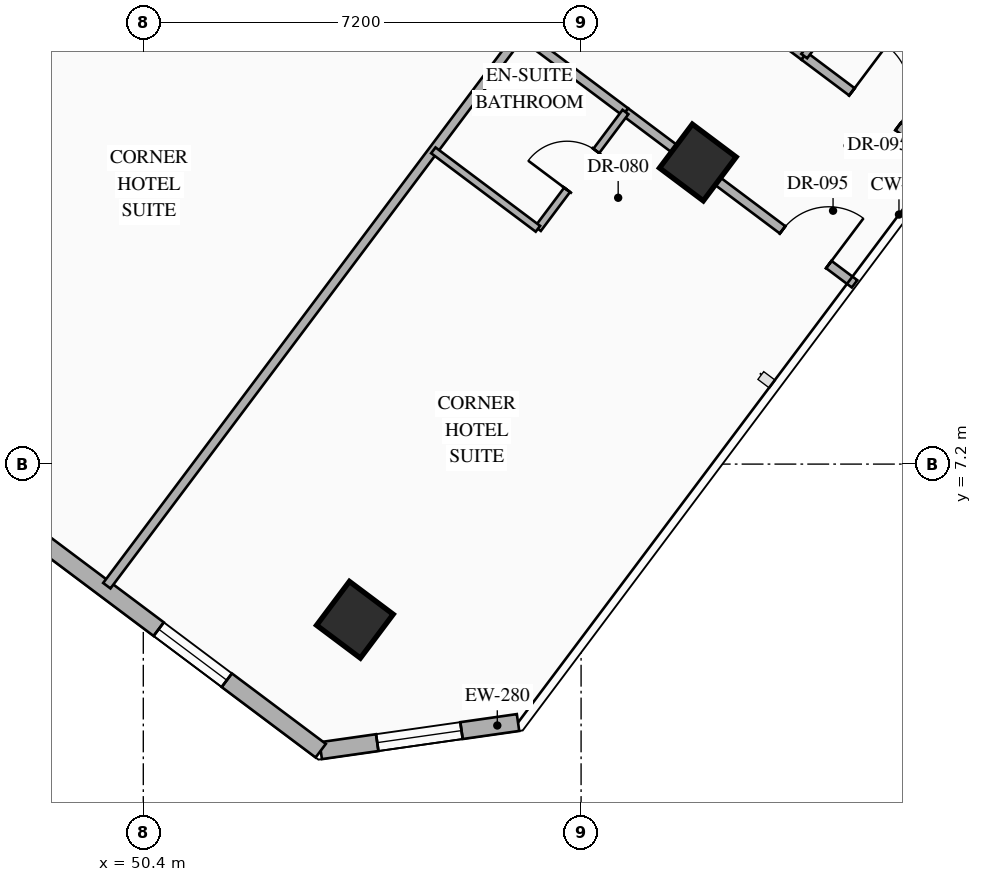
"""IFC4 building model, lengths in metres.
Left out: names, types, materials, properties, quantities, classifications, styles, units other than length and angle.
Written with IfcOpenShell. Run it as: python <this file> out.ifc"""

import sys

from ifc_helpers import new_model, si_unit, direction, frame, frame_2d, origin, origin_2d, place, context, subcontext, project, spatial, rectangle, hollow_rectangle, extrude, element, fill, save


model = new_model("IFC4")
c1 = context("Model", 3, precision=1e-05, world=origin(), true_north=direction((0.0, 1.0)))
c2 = subcontext(c1, "Body", "Model", "MODEL_VIEW")
j1 = project(units=[si_unit("LENGTHUNIT", "METRE"), si_unit("PLANEANGLEUNIT", "RADIAN")], contexts=[c1])
p1 = place(None, origin())
s1 = spatial("IfcSite", under=j1, at=p1, CompositionType="ELEMENT")
p2 = place(p1, origin())
s2 = spatial("IfcBuilding", under=s1, at=p2, CompositionType="ELEMENT")
p3 = place(p2, frame((0.0, 0.0, 81.3)))
s3 = spatial("IfcBuildingStorey", under=s2, at=p3, CompositionType="ELEMENT", Elevation=81.3)
for number, where, z_axis, x_axis in (
    (1, (53.88, 4.64, 0.0), (0.0, 0.0, 1.0), (0.8, -0.6, 0.0)),
    (2, (59.52, 12.16, 0.0), (0.0, 0.0, 1.0), (0.8, -0.6, 0.0)),
):
    element("IfcColumn", number, at=place(p3, frame(where, z_axis=z_axis, x_axis=x_axis)), inside=s3, PredefinedType="COLUMN", context=c2, shape_type="SweptSolid", body=[
        extrude(hollow_rectangle(XDim=0.9, YDim=0.9, WallThickness=0.036, at=origin_2d()), origin(), (0.0, 0.0, 1.0), 3.35),
    ])
p4 = place(p3, frame((56.563, 2.95, 0.0), z_axis=(0.0, 0.0, 1.0), x_axis=(-0.989977778067, -0.141223223777, 0.0)))
e3 = element("IfcWall", 3, at=p4, inside=s3, PredefinedType="STANDARD", context=c2, shape_type="SweptSolid", body=[
    extrude(rectangle(XDim=3.278, YDim=0.28, at=frame_2d((1.639, 0.0))), origin(), (0.0, 0.0, 1.0), 3.13),
])
p5 = place(p4, frame((0.939, 0.0, 0.85)))
e4 = element("IfcOpeningElement", 4, at=p5, cuts=e3, PredefinedType="OPENING", context=c2, shape_type="SweptSolid", body=[
    extrude(rectangle(XDim=1.4, YDim=1.8, at=frame_2d((0.7, 0.9))), frame((0.0, 0.15, 0.0), z_axis=(0.0, -1.0, 0.0), x_axis=(1.0, 0.0, 0.0)), (0.0, 0.0, 1.0), 0.3),
])
p6 = place(p3, frame((53.318, 2.487, 0.0), z_axis=(0.0, 0.0, 1.0), x_axis=(-0.800004174678, 0.599994433723, 0.0)))
e5 = element("IfcWall", 5, at=p6, inside=s3, PredefinedType="STANDARD", context=c2, shape_type="SweptSolid", body=[
    extrude(rectangle(XDim=35.089, YDim=0.28, at=frame_2d((17.544, 0.0))), origin(), (0.0, 0.0, 1.0), 3.13),
])
p7 = place(p6, frame((1.931, 0.0, 0.85)))
e6 = element("IfcOpeningElement", 6, at=p7, cuts=e5, PredefinedType="OPENING", context=c2, shape_type="SweptSolid", body=[
    extrude(rectangle(XDim=1.4, YDim=1.8, at=frame_2d((0.7, 0.9))), frame((0.0, 0.15, 0.0), z_axis=(0.0, -1.0, 0.0), x_axis=(1.0, 0.0, 0.0)), (0.0, 0.0, 1.0), 0.3),
])
p8 = place(p6, frame((6.819, 0.0, 0.85)))
e7 = element("IfcOpeningElement", 7, at=p8, cuts=e5, PredefinedType="OPENING", context=c2, shape_type="SweptSolid", body=[
    extrude(rectangle(XDim=1.4, YDim=1.8, at=frame_2d((0.7, 0.9))), frame((0.0, 0.15, 0.0), z_axis=(0.0, -1.0, 0.0), x_axis=(1.0, 0.0, 0.0)), (0.0, 0.0, 1.0), 0.3),
])
p9 = place(p6, frame((11.832, 0.0, 0.85)))
e8 = element("IfcOpeningElement", 8, at=p9, cuts=e5, PredefinedType="OPENING", context=c2, shape_type="SweptSolid", body=[
    extrude(rectangle(XDim=1.4, YDim=1.8, at=frame_2d((0.7, 0.9))), frame((0.0, 0.15, 0.0), z_axis=(0.0, -1.0, 0.0), x_axis=(1.0, 0.0, 0.0)), (0.0, 0.0, 1.0), 0.3),
])
p10 = place(p6, frame((17.647, 0.0, 0.85)))
e9 = element("IfcOpeningElement", 9, at=p10, cuts=e5, PredefinedType="OPENING", context=c2, shape_type="SweptSolid", body=[
    extrude(rectangle(XDim=1.4, YDim=1.8, at=frame_2d((0.7, 0.9))), frame((0.0, 0.15, 0.0), z_axis=(0.0, -1.0, 0.0), x_axis=(1.0, 0.0, 0.0)), (0.0, 0.0, 1.0), 0.3),
])
p11 = place(p6, frame((21.857, 0.0, 0.85)))
e10 = element("IfcOpeningElement", 10, at=p11, cuts=e5, PredefinedType="OPENING", context=c2, shape_type="SweptSolid", body=[
    extrude(rectangle(XDim=1.4, YDim=1.8, at=frame_2d((0.7, 0.9))), frame((0.0, 0.15, 0.0), z_axis=(0.0, -1.0, 0.0), x_axis=(1.0, 0.0, 0.0)), (0.0, 0.0, 1.0), 0.3),
])
p12 = place(p6, frame((26.87, 0.0, 0.85)))
e11 = element("IfcOpeningElement", 11, at=p12, cuts=e5, PredefinedType="OPENING", context=c2, shape_type="SweptSolid", body=[
    extrude(rectangle(XDim=1.4, YDim=1.8, at=frame_2d((0.7, 0.9))), frame((0.0, 0.15, 0.0), z_axis=(0.0, -1.0, 0.0), x_axis=(1.0, 0.0, 0.0)), (0.0, 0.0, 1.0), 0.3),
])
p13 = place(p6, frame((31.757, 0.0, 0.85)))
e12 = element("IfcOpeningElement", 12, at=p13, cuts=e5, PredefinedType="OPENING", context=c2, shape_type="SweptSolid", body=[
    extrude(rectangle(XDim=1.4, YDim=1.8, at=frame_2d((0.7, 0.9))), frame((0.0, 0.15, 0.0), z_axis=(0.0, -1.0, 0.0), x_axis=(1.0, 0.0, 0.0)), (0.0, 0.0, 1.0), 0.3),
])
p14 = place(p3, frame((59.55, 15.2, 0.0), z_axis=(0.0, 0.0, 1.0), x_axis=(0.79998637334, -0.60001816845, 0.0)))
e13 = element("IfcWall", 13, at=p14, inside=s3, PredefinedType="PARTITIONING", context=c2, shape_type="SweptSolid", body=[
    extrude(rectangle(XDim=2.15, YDim=0.15, at=frame_2d((1.075, 0.0))), origin(), (0.0, 0.0, 1.0), 2.775),
])
p15 = place(p3, frame((61.27, 13.91, 0.0), z_axis=(0.0, 0.0, 1.0), x_axis=(0.800010068184, -0.59998657552, 0.0)))
e14 = element("IfcWall", 14, at=p15, inside=s3, PredefinedType="PARTITIONING", context=c2, shape_type="SweptSolid", body=[
    extrude(rectangle(XDim=2.91, YDim=0.15, at=frame_2d((1.455, 0.0))), origin(), (0.0, 0.0, 1.0), 3.13),
])
p16 = place(p15, frame((0.98, 0.0, 0.0)))
e15 = element("IfcOpeningElement", 15, at=p16, cuts=e14, PredefinedType="OPENING", context=c2, shape_type="SweptSolid", body=[
    extrude(rectangle(XDim=0.95, YDim=2.15, at=frame_2d((0.475, 1.075))), frame((0.0, 0.085, 0.0), z_axis=(0.0, -1.0, 0.0), x_axis=(1.0, 0.0, 0.0)), (0.0, 0.0, 1.0), 0.17),
])
p17 = place(p3, frame((61.27, 13.91, 0.0), z_axis=(0.0, 0.0, 1.0), x_axis=(0.599951172744, 0.800036618114, 0.0)))
e16 = element("IfcWall", 16, at=p17, inside=s3, PredefinedType="PARTITIONING", context=c2, shape_type="SweptSolid", body=[
    extrude(rectangle(XDim=2.4, YDim=0.12, at=frame_2d((1.2, 0.0))), origin(), (0.0, 0.0, 1.0), 3.13),
])
p18 = place(p17, frame((0.8, 0.0, 0.0)))
e17 = element("IfcOpeningElement", 17, at=p18, cuts=e16, PredefinedType="OPENING", context=c2, shape_type="SweptSolid", body=[
    extrude(rectangle(XDim=0.8, YDim=2.06, at=frame_2d((0.4, 1.03))), frame((0.0, 0.07, 0.0), z_axis=(0.0, -1.0, 0.0), x_axis=(1.0, 0.0, 0.0)), (0.0, 0.0, 1.0), 0.14),
])
p19 = place(p3, frame((44.36, 9.28, 0.0), z_axis=(0.0, 0.0, 1.0), x_axis=(0.599986233332, 0.800010324816, 0.0)))
e18 = element("IfcWall", 18, at=p19, inside=s3, PredefinedType="PARTITIONING", context=c2, shape_type="SweptSolid", body=[
    extrude(rectangle(XDim=11.35, YDim=0.15, at=frame_2d((5.675, 0.0))), origin(), (0.0, 0.0, 1.0), 2.425),
])
p20 = place(p3, frame((49.8, 5.2, 0.0), z_axis=(0.0, 0.0, 1.0), x_axis=(0.6, 0.8, 0.0)))
e19 = element("IfcWall", 19, at=p20, inside=s3, PredefinedType="PARTITIONING", context=c2, shape_type="SweptSolid", body=[
    extrude(rectangle(XDim=11.35, YDim=0.15, at=frame_2d((5.675, 0.0))), origin(), (0.0, 0.0, 1.0), 3.13),
])
p21 = place(p3, frame((56.61, 14.28, 0.0), z_axis=(0.0, 0.0, 1.0), x_axis=(0.79998637334, -0.60001816845, 0.0)))
e20 = element("IfcWall", 20, at=p21, inside=s3, PredefinedType="PARTITIONING", context=c2, shape_type="SweptSolid", body=[
    extrude(rectangle(XDim=2.15, YDim=0.15, at=frame_2d((1.075, 0.0))), origin(), (0.0, 0.0, 1.0), 2.425),
])
p22 = place(p3, frame((58.33, 12.99, 0.0), z_axis=(0.0, 0.0, 1.0), x_axis=(0.799993779569, -0.600008293819, 0.0)))
e21 = element("IfcWall", 21, at=p22, inside=s3, PredefinedType="PARTITIONING", context=c2, shape_type="SweptSolid", body=[
    extrude(rectangle(XDim=4.71, YDim=0.15, at=frame_2d((2.355, 0.0))), origin(), (0.0, 0.0, 1.0), 2.425),
])
p23 = place(p22, frame((3.23, 0.0, 0.0)))
e22 = element("IfcOpeningElement", 22, at=p23, cuts=e21, PredefinedType="OPENING", context=c2, shape_type="SweptSolid", body=[
    extrude(rectangle(XDim=0.95, YDim=2.15, at=frame_2d((0.475, 1.075))), frame((0.0, 0.085, 0.0), z_axis=(0.0, -1.0, 0.0), x_axis=(1.0, 0.0, 0.0)), (0.0, 0.0, 1.0), 0.17),
])
p24 = place(p3, frame((56.89, 11.07, 0.0), z_axis=(0.0, 0.0, 1.0), x_axis=(0.600065100855, 0.79995117022, 0.0)))
e23 = element("IfcWall", 23, at=p24, inside=s3, PredefinedType="PARTITIONING", context=c2, shape_type="SweptSolid", body=[
    extrude(rectangle(XDim=2.4, YDim=0.12, at=frame_2d((1.2, 0.0))), origin(), (0.0, 0.0, 1.0), 3.13),
])
p25 = place(p24, frame((0.8, 0.0, 0.0)))
e24 = element("IfcOpeningElement", 24, at=p25, cuts=e23, PredefinedType="OPENING", context=c2, shape_type="SweptSolid", body=[
    extrude(rectangle(XDim=0.8, YDim=2.06, at=frame_2d((0.4, 1.03))), frame((0.0, 0.07, 0.0), z_axis=(0.0, -1.0, 0.0), x_axis=(1.0, 0.0, 0.0)), (0.0, 0.0, 1.0), 0.14),
])
p26 = place(p3, frame((55.17, 12.36, 0.0), z_axis=(0.0, 0.0, 1.0), x_axis=(0.79998637334, -0.60001816845, 0.0)))
e25 = element("IfcWall", 25, at=p26, inside=s3, PredefinedType="PARTITIONING", context=c2, shape_type="SweptSolid", body=[
    extrude(rectangle(XDim=2.15, YDim=0.12, at=frame_2d((1.075, 0.0))), origin(), (0.0, 0.0, 1.0), 3.13),
])
p27 = place(p5, origin())
e26 = element("IfcWindow", 26, at=p27, inside=s3, PartitioningType="SINGLE_PANEL", PredefinedType="WINDOW", context=c2, shape_type="SweptSolid", body=[
    extrude(rectangle(XDim=1.4, YDim=1.8, at=frame_2d((0.7, 0.9))), frame((0.0, 0.03, 0.0), z_axis=(0.0, -1.0, 0.0), x_axis=(1.0, 0.0, 0.0)), (0.0, 0.0, 1.0), 0.06),
])
fill(e4, e26)
p28 = place(p7, origin())
e27 = element("IfcWindow", 27, at=p28, inside=s3, PartitioningType="SINGLE_PANEL", PredefinedType="WINDOW", context=c2, shape_type="SweptSolid", body=[
    extrude(rectangle(XDim=1.4, YDim=1.8, at=frame_2d((0.7, 0.9))), frame((0.0, 0.03, 0.0), z_axis=(0.0, -1.0, 0.0), x_axis=(1.0, 0.0, 0.0)), (0.0, 0.0, 1.0), 0.06),
])
fill(e6, e27)
p29 = place(p16, origin())
e28 = element("IfcDoor", 28, at=p29, inside=s3, OperationType="SINGLE_SWING_LEFT", PredefinedType="DOOR", context=c2, shape_type="SweptSolid", body=[
    extrude(rectangle(XDim=0.95, YDim=2.15, at=frame_2d((0.475, 1.075))), frame((0.0, 0.025, 0.0), z_axis=(0.0, -1.0, 0.0), x_axis=(1.0, 0.0, 0.0)), (0.0, 0.0, 1.0), 0.05),
])
fill(e15, e28)
p30 = place(p23, origin())
e29 = element("IfcDoor", 29, at=p30, inside=s3, OperationType="SINGLE_SWING_RIGHT", PredefinedType="DOOR", context=c2, shape_type="SweptSolid", body=[
    extrude(rectangle(XDim=0.95, YDim=2.15, at=frame_2d((0.475, 1.075))), frame((0.0, 0.025, 0.0), z_axis=(0.0, -1.0, 0.0), x_axis=(1.0, 0.0, 0.0)), (0.0, 0.0, 1.0), 0.05),
])
fill(e22, e29)
p31 = place(p25, origin())
e30 = element("IfcDoor", 30, at=p31, inside=s3, OperationType="SINGLE_SWING_LEFT", PredefinedType="DOOR", context=c2, shape_type="SweptSolid", body=[
    extrude(rectangle(XDim=0.8, YDim=2.06, at=frame_2d((0.4, 1.03))), frame((0.0, 0.025, 0.0), z_axis=(0.0, -1.0, 0.0), x_axis=(1.0, 0.0, 0.0)), (0.0, 0.0, 1.0), 0.05),
])
fill(e24, e30)
save(model, sys.argv[1])
